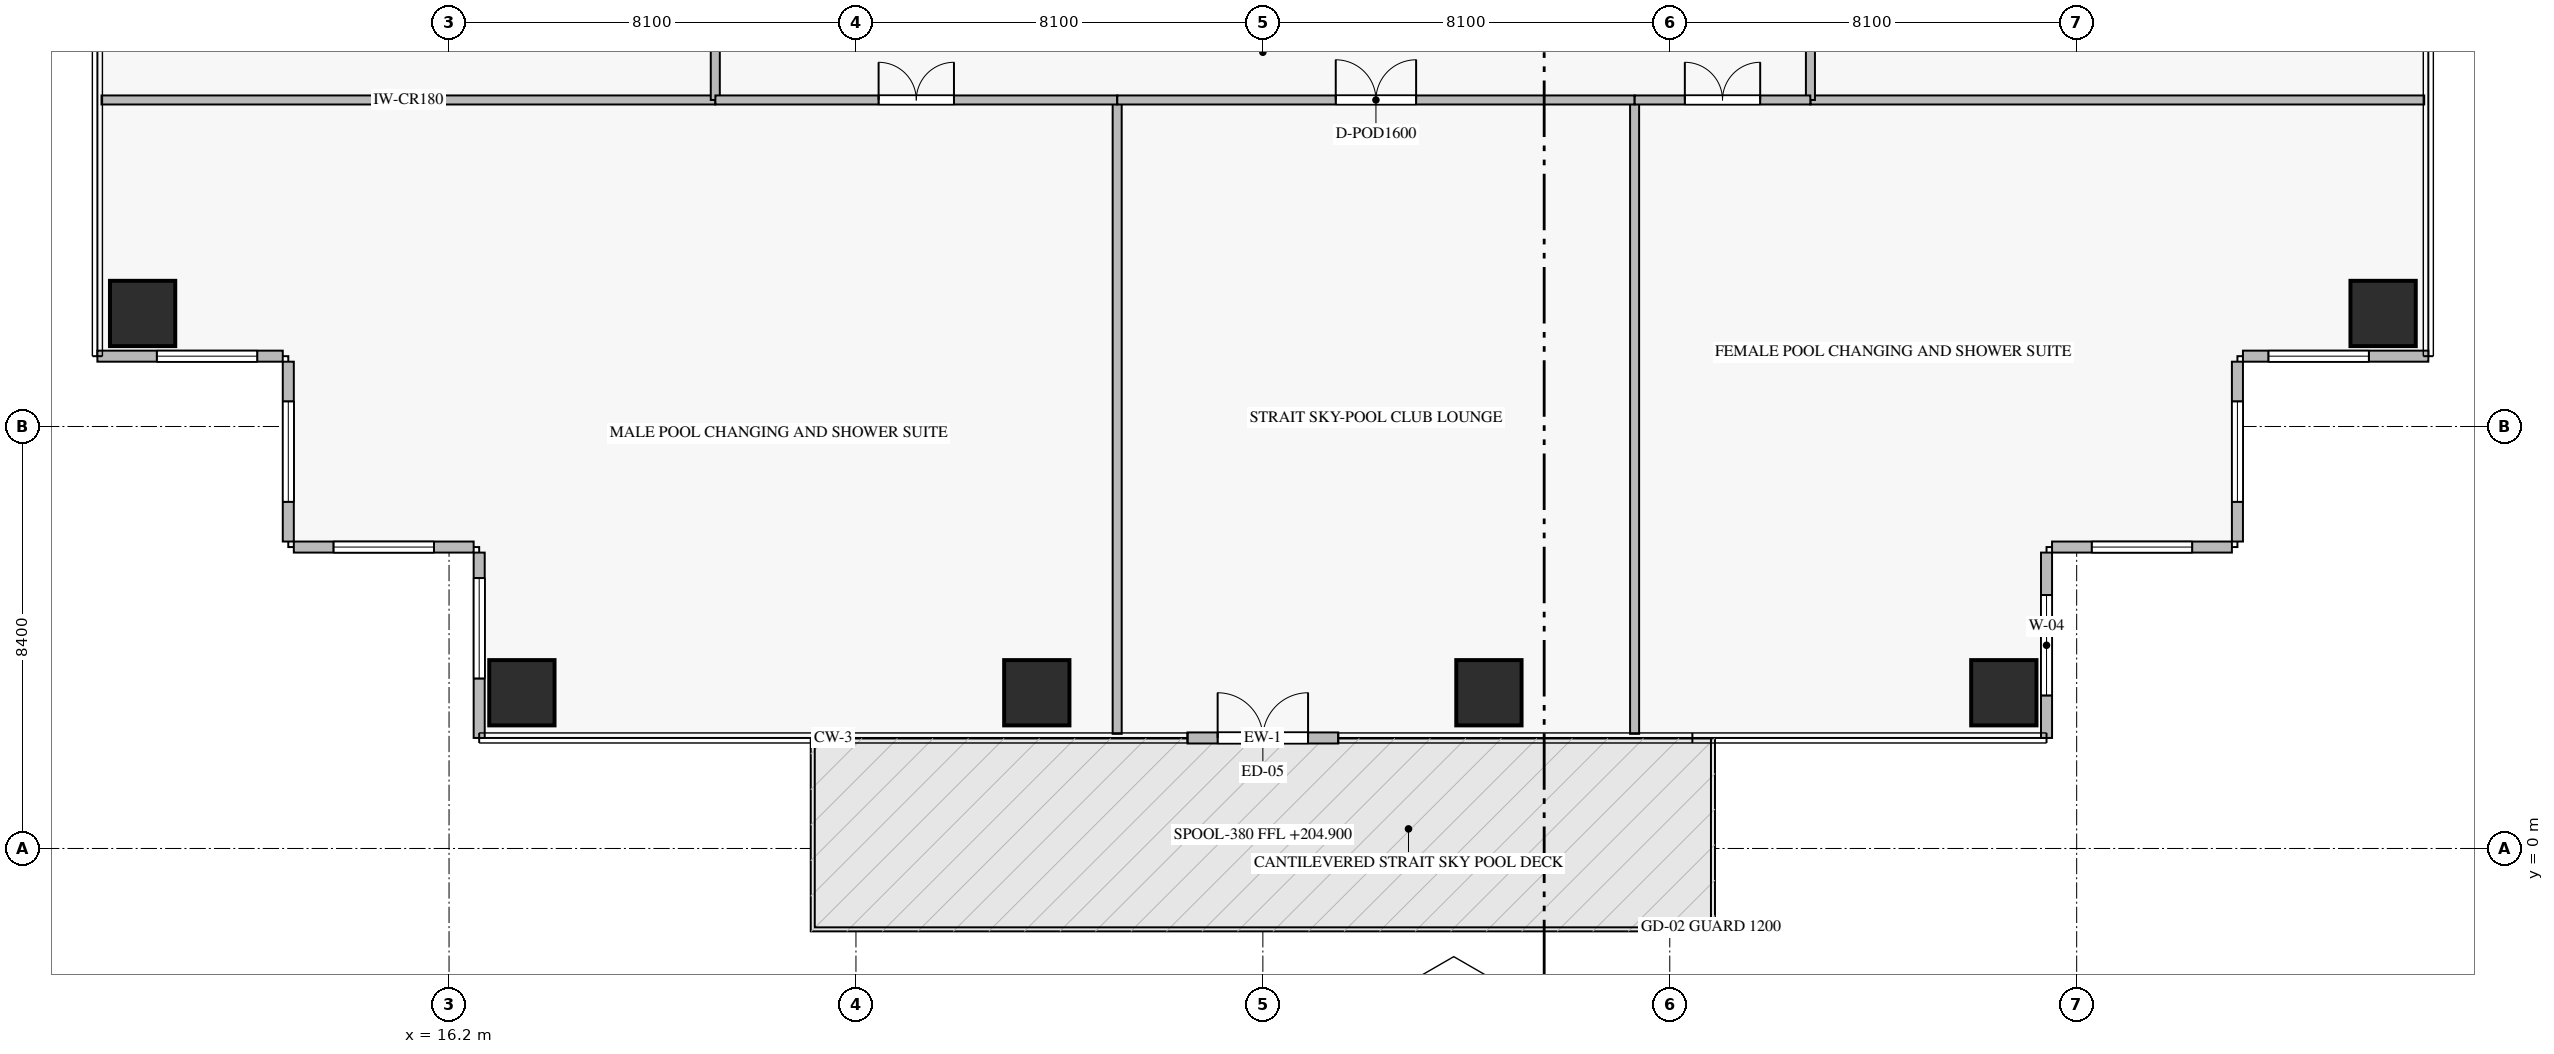
"""IFC4 building model, lengths in metres.
Left out: names, types, materials, properties, quantities, classifications, styles, units other than length and angle.
Written with IfcOpenShell. Run it as: python <this file> out.ifc"""

import sys

from ifc_helpers import new_model, si_unit, direction, frame, frame_2d, origin, origin_2d, place, context, subcontext, project, spatial, rectangle, extrude, source, transform, mapped, element, fill, save


model = new_model("IFC4")
c1 = context("Model", 3, precision=1e-05, world=origin(), true_north=direction((0.0, 1.0)))
c2 = subcontext(c1, "Body", "Model", "MODEL_VIEW")
j1 = project(units=[si_unit("LENGTHUNIT", "METRE"), si_unit("PLANEANGLEUNIT", "RADIAN")], contexts=[c1])
p1 = place(None, origin())
s1 = spatial("IfcSite", under=j1, at=p1, CompositionType="ELEMENT")
p2 = place(p1, origin())
s2 = spatial("IfcBuilding", under=s1, at=p2, CompositionType="ELEMENT")
p3 = place(p2, frame((0.0, 0.0, 204.9)))
s3 = spatial("IfcBuildingStorey", under=s2, at=p3, CompositionType="ELEMENT", Elevation=204.9)
m1 = source(origin(), c2, "Body", "SweptSolid", [
    extrude(rectangle(XDim=1.3, YDim=1.3, at=origin_2d()), origin(), (0.0, 0.0, 1.0), 5.47),
])
for number, where, z_axis, x_axis in (
    (1, (17.65, 3.1, -0.36), (0.0, 0.0, 1.0), (1.0, 0.0, 0.0)),
    (2, (27.9, 3.1, -0.36), (0.0, 0.0, 1.0), (1.0, 0.0, 0.0)),
    (3, (36.9, 3.1, -0.36), (0.0, 0.0, 1.0), (1.0, 0.0, 0.0)),
    (4, (47.15, 3.1, -0.36), (0.0, 0.0, 1.0), (1.0, 0.0, 0.0)),
    (5, (54.7, 10.65, -0.36), (0.0, 0.0, 1.0), (1.0, 0.0, 0.0)),
    (6, (10.1, 10.65, -0.36), (0.0, 0.0, 1.0), (1.0, 0.0, 0.0)),
):
    element("IfcColumn", number, at=place(p3, frame(where, z_axis=z_axis, x_axis=x_axis)), inside=s3, PredefinedType="COLUMN", context=c2, shape_type="MappedRepresentation", body=[
        mapped(m1, transform((0.0, 0.0, 0.0), scale=1.0)),
    ])
p4 = place(p3, frame((30.9, 2.2, 0.0), z_axis=(0.0, 0.0, 1.0), x_axis=(1.0, 0.0, 0.0)))
e7 = element("IfcWall", 7, at=p4, inside=s3, PredefinedType="ELEMENTEDWALL", context=c2, shape_type="SweptSolid", body=[
    extrude(rectangle(XDim=3.0, YDim=0.22, at=frame_2d((1.5, 0.0))), origin(), (0.0, 0.0, 1.0), 3.945),
])
p5 = place(p4, frame((0.6, 0.0, 0.0)))
e8 = element("IfcOpeningElement", 8, at=p5, cuts=e7, PredefinedType="OPENING", context=c2, shape_type="SweptSolid", body=[
    extrude(rectangle(XDim=1.8, YDim=2.4, at=frame_2d((0.9, 1.2))), frame((0.0, 0.12, 0.0), z_axis=(0.0, -1.0, 0.0), x_axis=(1.0, 0.0, 0.0)), (0.0, 0.0, 1.0), 0.24),
])
p6 = place(p3, frame((48.0, 2.2, 0.0), z_axis=(0.0, 0.0, 1.0), x_axis=(0.0, 1.0, 0.0)))
e9 = element("IfcWall", 9, at=p6, inside=s3, PredefinedType="ELEMENTEDWALL", context=c2, shape_type="SweptSolid", body=[
    extrude(rectangle(XDim=3.69, YDim=0.22, at=frame_2d((1.845, 0.0))), origin(), (0.0, 0.0, 1.0), 3.945),
])
p7 = place(p6, frame((0.845, 0.0, 0.65)))
e10 = element("IfcOpeningElement", 10, at=p7, cuts=e9, PredefinedType="OPENING", context=c2, shape_type="SweptSolid", body=[
    extrude(rectangle(XDim=2.0, YDim=2.2, at=frame_2d((1.0, 1.1))), frame((0.0, 0.12, 0.0), z_axis=(0.0, -1.0, 0.0), x_axis=(1.0, 0.0, 0.0)), (0.0, 0.0, 1.0), 0.24),
])
p8 = place(p3, frame((48.11, 6.0, 0.0), z_axis=(0.0, 0.0, 1.0), x_axis=(1.0, 0.0, 0.0)))
e11 = element("IfcWall", 11, at=p8, inside=s3, PredefinedType="ELEMENTEDWALL", context=c2, shape_type="SweptSolid", body=[
    extrude(rectangle(XDim=3.58, YDim=0.22, at=frame_2d((1.79, 0.0))), origin(), (0.0, 0.0, 1.0), 5.095),
])
p9 = place(p8, frame((0.79, 0.0, 0.65)))
e12 = element("IfcOpeningElement", 12, at=p9, cuts=e11, PredefinedType="OPENING", context=c2, shape_type="SweptSolid", body=[
    extrude(rectangle(XDim=2.0, YDim=2.2, at=frame_2d((1.0, 1.1))), frame((0.0, 0.12, 0.0), z_axis=(0.0, -1.0, 0.0), x_axis=(1.0, 0.0, 0.0)), (0.0, 0.0, 1.0), 0.24),
])
p10 = place(p3, frame((51.8, 6.11, 0.0), z_axis=(0.0, 0.0, 1.0), x_axis=(0.0, 1.0, 0.0)))
e13 = element("IfcWall", 13, at=p10, inside=s3, PredefinedType="ELEMENTEDWALL", context=c2, shape_type="SweptSolid", body=[
    extrude(rectangle(XDim=3.58, YDim=0.22, at=frame_2d((1.79, 0.0))), origin(), (0.0, 0.0, 1.0), 5.095),
])
p11 = place(p10, frame((0.79, 0.0, 0.65)))
e14 = element("IfcOpeningElement", 14, at=p11, cuts=e13, PredefinedType="OPENING", context=c2, shape_type="SweptSolid", body=[
    extrude(rectangle(XDim=2.0, YDim=2.2, at=frame_2d((1.0, 1.1))), frame((0.0, 0.12, 0.0), z_axis=(0.0, -1.0, 0.0), x_axis=(1.0, 0.0, 0.0)), (0.0, 0.0, 1.0), 0.24),
])
p12 = place(p3, frame((51.91, 9.8, 0.0), z_axis=(0.0, 0.0, 1.0), x_axis=(1.0, 0.0, 0.0)))
e15 = element("IfcWall", 15, at=p12, inside=s3, PredefinedType="ELEMENTEDWALL", context=c2, shape_type="SweptSolid", body=[
    extrude(rectangle(XDim=3.69, YDim=0.22, at=frame_2d((1.845, 0.0))), origin(), (0.0, 0.0, 1.0), 3.945),
])
p13 = place(p12, frame((0.507, 0.0, 0.65)))
e16 = element("IfcOpeningElement", 16, at=p13, cuts=e15, PredefinedType="OPENING", context=c2, shape_type="SweptSolid", body=[
    extrude(rectangle(XDim=2.0, YDim=2.2, at=frame_2d((1.0, 1.1))), frame((0.0, 0.12, 0.0), z_axis=(0.0, -1.0, 0.0), x_axis=(1.0, 0.0, 0.0)), (0.0, 0.0, 1.0), 0.24),
])
p14 = place(p3, frame((9.2, 9.8, 0.0), z_axis=(0.0, 0.0, 1.0), x_axis=(1.0, 0.0, 0.0)))
e17 = element("IfcWall", 17, at=p14, inside=s3, PredefinedType="ELEMENTEDWALL", context=c2, shape_type="SweptSolid", body=[
    extrude(rectangle(XDim=3.69, YDim=0.22, at=frame_2d((1.845, 0.0))), origin(), (0.0, 0.0, 1.0), 3.945),
])
p15 = place(p14, frame((1.183, 0.0, 0.65)))
e18 = element("IfcOpeningElement", 18, at=p15, cuts=e17, PredefinedType="OPENING", context=c2, shape_type="SweptSolid", body=[
    extrude(rectangle(XDim=2.0, YDim=2.2, at=frame_2d((1.0, 1.1))), frame((0.0, 0.12, 0.0), z_axis=(0.0, -1.0, 0.0), x_axis=(1.0, 0.0, 0.0)), (0.0, 0.0, 1.0), 0.24),
])
p16 = place(p3, frame((13.0, 9.69, 0.0), z_axis=(0.0, 0.0, 1.0), x_axis=(0.0, -1.0, 0.0)))
e19 = element("IfcWall", 19, at=p16, inside=s3, PredefinedType="ELEMENTEDWALL", context=c2, shape_type="SweptSolid", body=[
    extrude(rectangle(XDim=3.58, YDim=0.22, at=frame_2d((1.79, 0.0))), origin(), (0.0, 0.0, 1.0), 5.095),
])
p17 = place(p16, frame((0.79, 0.0, 0.65)))
e20 = element("IfcOpeningElement", 20, at=p17, cuts=e19, PredefinedType="OPENING", context=c2, shape_type="SweptSolid", body=[
    extrude(rectangle(XDim=2.0, YDim=2.2, at=frame_2d((1.0, 1.1))), frame((0.0, 0.12, 0.0), z_axis=(0.0, -1.0, 0.0), x_axis=(1.0, 0.0, 0.0)), (0.0, 0.0, 1.0), 0.24),
])
p18 = place(p3, frame((13.11, 6.0, 0.0), z_axis=(0.0, 0.0, 1.0), x_axis=(1.0, 0.0, 0.0)))
e21 = element("IfcWall", 21, at=p18, inside=s3, PredefinedType="ELEMENTEDWALL", context=c2, shape_type="SweptSolid", body=[
    extrude(rectangle(XDim=3.58, YDim=0.22, at=frame_2d((1.79, 0.0))), origin(), (0.0, 0.0, 1.0), 5.095),
])
p19 = place(p18, frame((0.79, 0.0, 0.65)))
e22 = element("IfcOpeningElement", 22, at=p19, cuts=e21, PredefinedType="OPENING", context=c2, shape_type="SweptSolid", body=[
    extrude(rectangle(XDim=2.0, YDim=2.2, at=frame_2d((1.0, 1.1))), frame((0.0, 0.12, 0.0), z_axis=(0.0, -1.0, 0.0), x_axis=(1.0, 0.0, 0.0)), (0.0, 0.0, 1.0), 0.24),
])
p20 = place(p3, frame((16.8, 5.89, 0.0), z_axis=(0.0, 0.0, 1.0), x_axis=(0.0, -1.0, 0.0)))
e23 = element("IfcWall", 23, at=p20, inside=s3, PredefinedType="ELEMENTEDWALL", context=c2, shape_type="SweptSolid", body=[
    extrude(rectangle(XDim=3.69, YDim=0.22, at=frame_2d((1.845, 0.0))), origin(), (0.0, 0.0, 1.0), 3.945),
])
p21 = place(p20, frame((0.507, 0.0, 0.65)))
e24 = element("IfcOpeningElement", 24, at=p21, cuts=e23, PredefinedType="OPENING", context=c2, shape_type="SweptSolid", body=[
    extrude(rectangle(XDim=2.0, YDim=2.2, at=frame_2d((1.0, 1.1))), frame((0.0, 0.12, 0.0), z_axis=(0.0, -1.0, 0.0), x_axis=(1.0, 0.0, 0.0)), (0.0, 0.0, 1.0), 0.24),
])
for number, where, z_axis, x_axis in (
    (25, (9.282, 14.9, 0.0), (0.0, 0.0, 1.0), (1.0, 0.0, 0.0)),
    (26, (43.3, 14.9, 0.0), (0.0, 0.0, 1.0), (1.0, 0.0, 0.0)),
):
    element("IfcWall", number, at=place(p3, frame(where, z_axis=z_axis, x_axis=x_axis)), inside=s3, PredefinedType="PARTITIONING", context=c2, shape_type="SweptSolid", body=[
        extrude(rectangle(XDim=12.218, YDim=0.18, at=frame_2d((6.109, 0.0))), origin(), (0.0, 0.0, 1.0), 5.11),
    ])
p22 = place(p3, frame((21.5, 14.9, 0.0), z_axis=(0.0, 0.0, 1.0), x_axis=(0.0, 1.0, 0.0)))
e27 = element("IfcWall", 27, at=p22, inside=s3, PredefinedType="PARTITIONING", context=c2, shape_type="SweptSolid", body=[
    extrude(rectangle(XDim=20.6, YDim=0.18, at=frame_2d((10.3, 0.0))), origin(), (0.0, 0.0, 1.0), 5.11),
])
p23 = place(p22, frame((9.55, 0.0, 0.0)))
e28 = element("IfcOpeningElement", 28, at=p23, cuts=e27, PredefinedType="OPENING", context=c2, shape_type="SweptSolid", body=[
    extrude(rectangle(XDim=1.5, YDim=2.25, at=frame_2d((0.75, 1.125))), frame((0.0, 0.1, 0.0), z_axis=(0.0, -1.0, 0.0), x_axis=(1.0, 0.0, 0.0)), (0.0, 0.0, 1.0), 0.2),
])
p24 = place(p3, frame((43.3, 14.9, 0.0), z_axis=(0.0, 0.0, 1.0), x_axis=(0.0, 1.0, 0.0)))
e29 = element("IfcWall", 29, at=p24, inside=s3, PredefinedType="PARTITIONING", context=c2, shape_type="SweptSolid", body=[
    extrude(rectangle(XDim=20.6, YDim=0.18, at=frame_2d((10.3, 0.0))), origin(), (0.0, 0.0, 1.0), 5.11),
])
p25 = place(p24, frame((9.55, 0.0, 0.0)))
e30 = element("IfcOpeningElement", 30, at=p25, cuts=e29, PredefinedType="OPENING", context=c2, shape_type="SweptSolid", body=[
    extrude(rectangle(XDim=1.5, YDim=2.25, at=frame_2d((0.75, 1.125))), frame((0.0, 0.1, 0.0), z_axis=(0.0, -1.0, 0.0), x_axis=(1.0, 0.0, 0.0)), (0.0, 0.0, 1.0), 0.2),
])
for number, where, z_axis, x_axis in (
    (31, (29.5, 2.282, 0.0), (0.0, 0.0, 1.0), (0.0, 1.0, 0.0)),
    (32, (39.8, 2.282, 0.0), (0.0, 0.0, 1.0), (0.0, 1.0, 0.0)),
):
    element("IfcWall", number, at=place(p3, frame(where, z_axis=z_axis, x_axis=x_axis)), inside=s3, PredefinedType="PARTITIONING", context=c2, shape_type="SweptSolid", body=[
        extrude(rectangle(XDim=12.618, YDim=0.18, at=frame_2d((6.309, 0.0))), origin(), (0.0, 0.0, 1.0), 5.11),
    ])
p26 = place(p3, frame((21.502, 14.9, 0.0), z_axis=(0.0, 0.0, 1.0), x_axis=(1.0, 0.0, 0.0)))
e33 = element("IfcWall", 33, at=p26, inside=s3, PredefinedType="PARTITIONING", context=c2, shape_type="SweptSolid", body=[
    extrude(rectangle(XDim=7.998, YDim=0.18, at=frame_2d((3.999, 0.0))), origin(), (0.0, 0.0, 1.0), 5.11),
])
p27 = place(p26, frame((3.249, 0.0, 0.0)))
e34 = element("IfcOpeningElement", 34, at=p27, cuts=e33, PredefinedType="OPENING", context=c2, shape_type="SweptSolid", body=[
    extrude(rectangle(XDim=1.5, YDim=2.25, at=frame_2d((0.75, 1.125))), frame((0.0, 0.1, 0.0), z_axis=(0.0, -1.0, 0.0), x_axis=(1.0, 0.0, 0.0)), (0.0, 0.0, 1.0), 0.2),
])
p28 = place(p3, frame((29.502, 14.9, 0.0), z_axis=(0.0, 0.0, 1.0), x_axis=(1.0, 0.0, 0.0)))
e35 = element("IfcWall", 35, at=p28, inside=s3, PredefinedType="PARTITIONING", context=c2, shape_type="SweptSolid", body=[
    extrude(rectangle(XDim=10.298, YDim=0.18, at=frame_2d((5.149, 0.0))), origin(), (0.0, 0.0, 1.0), 5.11),
])
p29 = place(p28, frame((4.349, 0.0, 0.0)))
e36 = element("IfcOpeningElement", 36, at=p29, cuts=e35, PredefinedType="OPENING", context=c2, shape_type="SweptSolid", body=[
    extrude(rectangle(XDim=1.6, YDim=2.3, at=frame_2d((0.8, 1.15))), frame((0.0, 0.1, 0.0), z_axis=(0.0, -1.0, 0.0), x_axis=(1.0, 0.0, 0.0)), (0.0, 0.0, 1.0), 0.2),
])
p30 = place(p3, frame((39.802, 14.9, 0.0), z_axis=(0.0, 0.0, 1.0), x_axis=(1.0, 0.0, 0.0)))
e37 = element("IfcWall", 37, at=p30, inside=s3, PredefinedType="PARTITIONING", context=c2, shape_type="SweptSolid", body=[
    extrude(rectangle(XDim=3.496, YDim=0.18, at=frame_2d((1.748, 0.0))), origin(), (0.0, 0.0, 1.0), 5.11),
])
p31 = place(p30, frame((0.998, 0.0, 0.0)))
e38 = element("IfcOpeningElement", 38, at=p31, cuts=e37, PredefinedType="OPENING", context=c2, shape_type="SweptSolid", body=[
    extrude(rectangle(XDim=1.5, YDim=2.25, at=frame_2d((0.75, 1.125))), frame((0.0, 0.1, 0.0), z_axis=(0.0, -1.0, 0.0), x_axis=(1.0, 0.0, 0.0)), (0.0, 0.0, 1.0), 0.2),
])
m2 = source(origin(), c2, "Body", "SweptSolid", [
    extrude(rectangle(XDim=1.8, YDim=2.4, at=frame_2d((0.9, 1.2))), frame((0.0, 0.025, 0.0), z_axis=(0.0, -1.0, 0.0), x_axis=(1.0, 0.0, 0.0)), (0.0, 0.0, 1.0), 0.05),
])
p32 = place(p5, origin())
e39 = element("IfcDoor", 39, at=p32, inside=s3, OperationType="DOUBLE_DOOR_SINGLE_SWING", PredefinedType="DOOR", context=c2, shape_type="MappedRepresentation", body=[
    mapped(m2, transform((0.0, 0.0, 0.0), scale=1.0)),
])
fill(e8, e39)
m3 = source(origin(), c2, "Body", "SweptSolid", [
    extrude(rectangle(XDim=2.0, YDim=2.2, at=frame_2d((1.0, 1.1))), frame((0.0, 0.03, 0.0), z_axis=(0.0, -1.0, 0.0), x_axis=(1.0, 0.0, 0.0)), (0.0, 0.0, 1.0), 0.06),
])
p33 = place(p7, origin())
e40 = element("IfcWindow", 40, at=p33, inside=s3, PartitioningType="SINGLE_PANEL", PredefinedType="WINDOW", context=c2, shape_type="MappedRepresentation", body=[
    mapped(m3, transform((0.0, 0.0, 0.0), scale=1.0)),
])
fill(e10, e40)
p34 = place(p9, origin())
e41 = element("IfcWindow", 41, at=p34, inside=s3, PartitioningType="SINGLE_PANEL", PredefinedType="WINDOW", context=c2, shape_type="MappedRepresentation", body=[
    mapped(m3, transform((0.0, 0.0, 0.0), scale=1.0)),
])
fill(e12, e41)
p35 = place(p11, origin())
e42 = element("IfcWindow", 42, at=p35, inside=s3, PartitioningType="SINGLE_PANEL", PredefinedType="WINDOW", context=c2, shape_type="MappedRepresentation", body=[
    mapped(m3, transform((0.0, 0.0, 0.0), scale=1.0)),
])
fill(e14, e42)
p36 = place(p13, origin())
e43 = element("IfcWindow", 43, at=p36, inside=s3, PartitioningType="SINGLE_PANEL", PredefinedType="WINDOW", context=c2, shape_type="MappedRepresentation", body=[
    mapped(m3, transform((0.0, 0.0, 0.0), scale=1.0)),
])
fill(e16, e43)
p37 = place(p15, origin())
e44 = element("IfcWindow", 44, at=p37, inside=s3, PartitioningType="SINGLE_PANEL", PredefinedType="WINDOW", context=c2, shape_type="MappedRepresentation", body=[
    mapped(m3, transform((0.0, 0.0, 0.0), scale=1.0)),
])
fill(e18, e44)
p38 = place(p17, origin())
e45 = element("IfcWindow", 45, at=p38, inside=s3, PartitioningType="SINGLE_PANEL", PredefinedType="WINDOW", context=c2, shape_type="MappedRepresentation", body=[
    mapped(m3, transform((0.0, 0.0, 0.0), scale=1.0)),
])
fill(e20, e45)
p39 = place(p19, origin())
e46 = element("IfcWindow", 46, at=p39, inside=s3, PartitioningType="SINGLE_PANEL", PredefinedType="WINDOW", context=c2, shape_type="MappedRepresentation", body=[
    mapped(m3, transform((0.0, 0.0, 0.0), scale=1.0)),
])
fill(e22, e46)
p40 = place(p21, origin())
e47 = element("IfcWindow", 47, at=p40, inside=s3, PartitioningType="SINGLE_PANEL", PredefinedType="WINDOW", context=c2, shape_type="MappedRepresentation", body=[
    mapped(m3, transform((0.0, 0.0, 0.0), scale=1.0)),
])
fill(e24, e47)
m4 = source(origin(), c2, "Body", "SweptSolid", [
    extrude(rectangle(XDim=1.5, YDim=2.25, at=frame_2d((0.75, 1.125))), frame((0.0, 0.025, 0.0), z_axis=(0.0, -1.0, 0.0), x_axis=(1.0, 0.0, 0.0)), (0.0, 0.0, 1.0), 0.05),
])
p41 = place(p27, origin())
e48 = element("IfcDoor", 48, at=p41, inside=s3, OperationType="DOUBLE_DOOR_SINGLE_SWING", PredefinedType="DOOR", context=c2, shape_type="MappedRepresentation", body=[
    mapped(m4, transform((0.0, 0.0, 0.0), scale=1.0)),
])
fill(e34, e48)
m5 = source(origin(), c2, "Body", "SweptSolid", [
    extrude(rectangle(XDim=1.6, YDim=2.3, at=frame_2d((0.8, 1.15))), frame((0.0, 0.025, 0.0), z_axis=(0.0, -1.0, 0.0), x_axis=(1.0, 0.0, 0.0)), (0.0, 0.0, 1.0), 0.05),
])
p42 = place(p29, origin())
e49 = element("IfcDoor", 49, at=p42, inside=s3, OperationType="DOUBLE_DOOR_SINGLE_SWING", PredefinedType="DOOR", context=c2, shape_type="MappedRepresentation", body=[
    mapped(m5, transform((0.0, 0.0, 0.0), scale=1.0)),
])
fill(e36, e49)
p43 = place(p31, origin())
e50 = element("IfcDoor", 50, at=p43, inside=s3, OperationType="DOUBLE_DOOR_SINGLE_SWING", PredefinedType="DOOR", context=c2, shape_type="MappedRepresentation", body=[
    mapped(m4, transform((0.0, 0.0, 0.0), scale=1.0)),
])
fill(e38, e50)
save(model, sys.argv[1])
